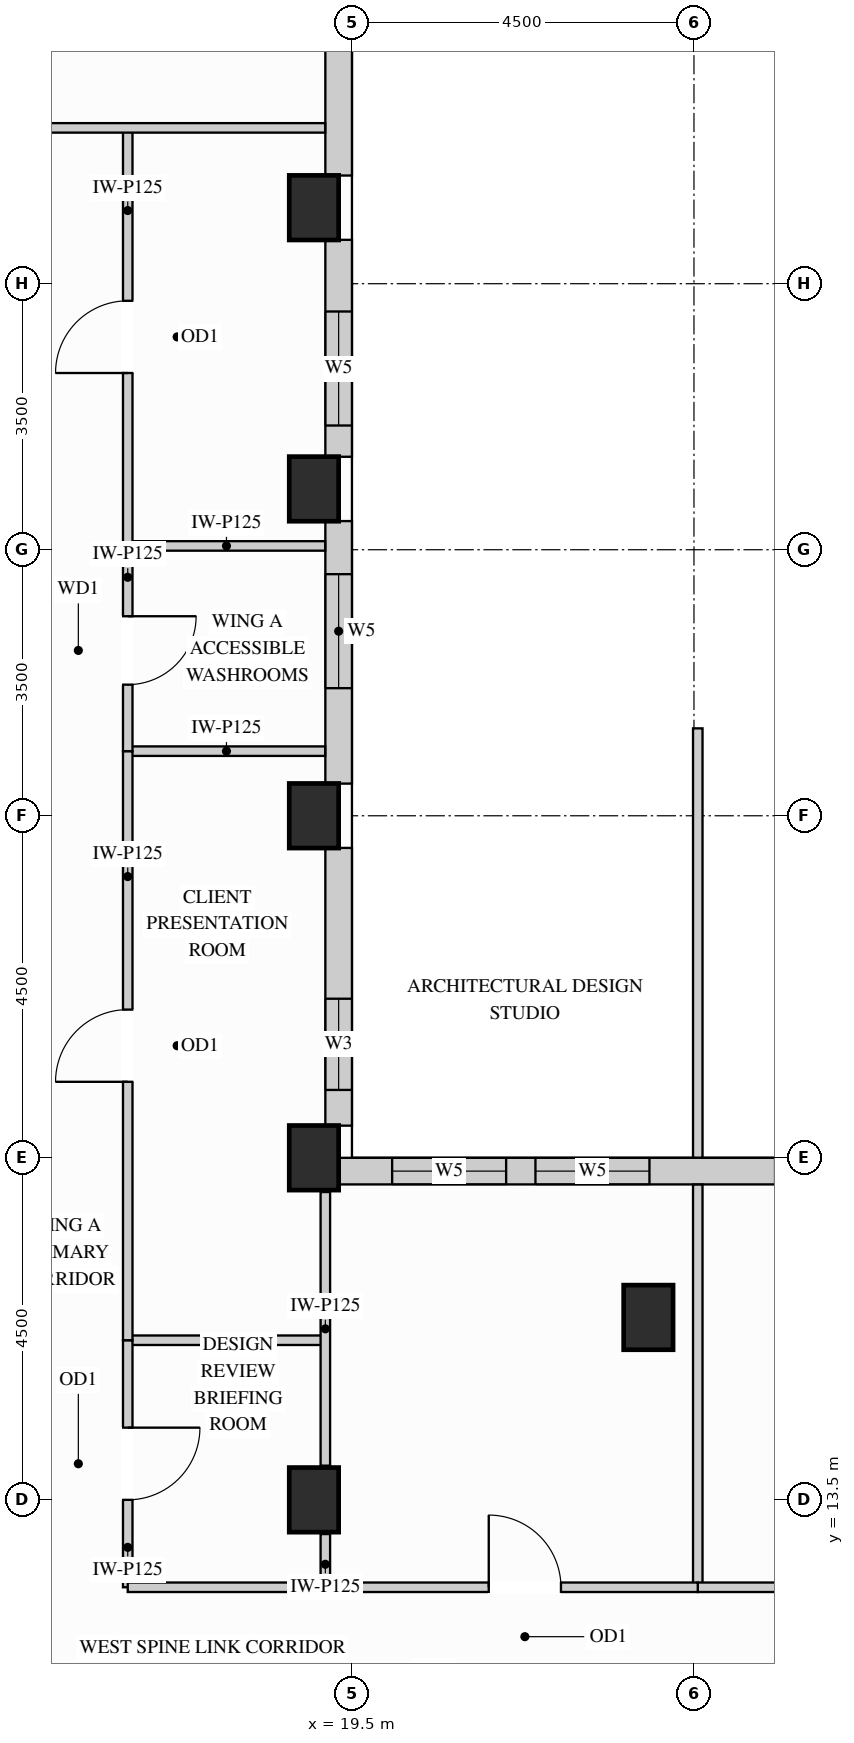
"""IFC4 building model, lengths in metres.
Left out: names, types, materials, properties, quantities, classifications, styles, units other than length and angle.
Written with IfcOpenShell. Run it as: python <this file> out.ifc"""

import sys

from ifc_helpers import new_model, si_unit, direction, frame, frame_2d, origin, origin_2d, place, context, subcontext, project, spatial, rectangle, extrude, source, transform, mapped, element, fill, save


model = new_model("IFC4")
c1 = context("Model", 3, precision=1e-05, world=origin(), true_north=direction((0.0, 1.0)))
c2 = subcontext(c1, "Body", "Model", "MODEL_VIEW")
j1 = project(units=[si_unit("LENGTHUNIT", "METRE"), si_unit("PLANEANGLEUNIT", "RADIAN")], contexts=[c1])
p1 = place(None, origin())
s1 = spatial("IfcSite", under=j1, at=p1, CompositionType="ELEMENT")
p2 = place(p1, origin())
s2 = spatial("IfcBuilding", under=s1, at=p2, CompositionType="ELEMENT")
p3 = place(p2, frame((0.0, 0.0, 219.6)))
s3 = spatial("IfcBuildingStorey", under=s2, at=p3, CompositionType="ELEMENT", Elevation=219.6)
m1 = source(origin(), c2, "Body", "SweptSolid", [
    extrude(rectangle(XDim=0.65, YDim=0.85, at=origin_2d()), origin(), (0.0, 0.0, 1.0), 3.4),
])
for number, where, z_axis, x_axis in (
    (1, (19.0, 13.5, 0.0), (0.0, 0.0, 1.0), (1.0, 0.0, 0.0)),
    (2, (19.0, 18.0, 0.0), (0.0, 0.0, 1.0), (1.0, 0.0, 0.0)),
    (3, (19.0, 22.5, 0.0), (0.0, 0.0, 1.0), (1.0, 0.0, 0.0)),
    (4, (19.0, 26.8, 0.0), (0.0, 0.0, 1.0), (1.0, 0.0, 0.0)),
    (5, (19.0, 30.5, 0.0), (0.0, 0.0, 1.0), (1.0, 0.0, 0.0)),
    (6, (23.4, 15.9, 0.0), (0.0, 0.0, 1.0), (1.0, 0.0, 0.0)),
):
    element("IfcColumn", number, at=place(p3, frame(where, z_axis=z_axis, x_axis=x_axis)), inside=s3, PredefinedType="COLUMN", context=c2, shape_type="MappedRepresentation", body=[
        mapped(m1, transform((0.0, 0.0, 0.0), x_axis=(1.0, 0.0, 0.0), y_axis=(0.0, 1.0, 0.0), z_axis=(0.0, 0.0, 1.0))),
    ])
p4 = place(p3, frame((34.577, 17.825, 0.0), z_axis=(0.0, 0.0, 1.0), x_axis=(-1.0, 0.0, 0.0)))
e7 = element("IfcWall", 7, at=p4, inside=s3, PredefinedType="SOLIDWALL", context=c2, shape_type="SweptSolid", body=[
    extrude(rectangle(XDim=15.254, YDim=0.35, at=frame_2d((7.627, 0.0))), origin(), (0.0, 0.0, 1.0), 3.385),
])
p5 = place(p4, frame((0.706, 0.0, 0.78)))
e8 = element("IfcOpeningElement", 8, at=p5, cuts=e7, PredefinedType="OPENING", context=c2, shape_type="SweptSolid", body=[
    extrude(rectangle(XDim=1.5, YDim=2.0, at=frame_2d((0.75, 1.0))), frame((0.0, 0.185, 0.0), z_axis=(0.0, -1.0, 0.0), x_axis=(1.0, 0.0, 0.0)), (0.0, 0.0, 1.0), 0.37),
])
p6 = place(p4, frame((2.591, 0.0, 0.78)))
e9 = element("IfcOpeningElement", 9, at=p6, cuts=e7, PredefinedType="OPENING", context=c2, shape_type="SweptSolid", body=[
    extrude(rectangle(XDim=1.5, YDim=2.0, at=frame_2d((0.75, 1.0))), frame((0.0, 0.185, 0.0), z_axis=(0.0, -1.0, 0.0), x_axis=(1.0, 0.0, 0.0)), (0.0, 0.0, 1.0), 0.37),
])
p7 = place(p4, frame((5.744, 0.0, 0.78)))
e10 = element("IfcOpeningElement", 10, at=p7, cuts=e7, PredefinedType="OPENING", context=c2, shape_type="SweptSolid", body=[
    extrude(rectangle(XDim=1.5, YDim=2.0, at=frame_2d((0.75, 1.0))), frame((0.0, 0.185, 0.0), z_axis=(0.0, -1.0, 0.0), x_axis=(1.0, 0.0, 0.0)), (0.0, 0.0, 1.0), 0.37),
])
p8 = place(p4, frame((8.01, 0.0, 0.78)))
e11 = element("IfcOpeningElement", 11, at=p8, cuts=e7, PredefinedType="OPENING", context=c2, shape_type="SweptSolid", body=[
    extrude(rectangle(XDim=1.5, YDim=2.0, at=frame_2d((0.75, 1.0))), frame((0.0, 0.185, 0.0), z_axis=(0.0, -1.0, 0.0), x_axis=(1.0, 0.0, 0.0)), (0.0, 0.0, 1.0), 0.37),
])
p9 = place(p4, frame((11.163, 0.0, 0.78)))
e12 = element("IfcOpeningElement", 12, at=p9, cuts=e7, PredefinedType="OPENING", context=c2, shape_type="SweptSolid", body=[
    extrude(rectangle(XDim=1.5, YDim=2.0, at=frame_2d((0.75, 1.0))), frame((0.0, 0.185, 0.0), z_axis=(0.0, -1.0, 0.0), x_axis=(1.0, 0.0, 0.0)), (0.0, 0.0, 1.0), 0.37),
])
p10 = place(p4, frame((13.048, 0.0, 0.78)))
e13 = element("IfcOpeningElement", 13, at=p10, cuts=e7, PredefinedType="OPENING", context=c2, shape_type="SweptSolid", body=[
    extrude(rectangle(XDim=1.5, YDim=2.0, at=frame_2d((0.75, 1.0))), frame((0.0, 0.185, 0.0), z_axis=(0.0, -1.0, 0.0), x_axis=(1.0, 0.0, 0.0)), (0.0, 0.0, 1.0), 0.37),
])
p11 = place(p3, frame((19.325, 18.423, 0.0), z_axis=(0.0, 0.0, 1.0), x_axis=(0.0, 1.0, 0.0)))
e14 = element("IfcWall", 14, at=p11, inside=s3, PredefinedType="SOLIDWALL", context=c2, shape_type="SweptSolid", body=[
    extrude(rectangle(XDim=3.654, YDim=0.35, at=frame_2d((1.827, 0.0))), origin(), (0.0, 0.0, 1.0), 2.619),
])
p12 = place(p11, frame((0.47, 0.0, 0.78)))
e15 = element("IfcOpeningElement", 15, at=p12, cuts=e14, PredefinedType="OPENING", context=c2, shape_type="SweptSolid", body=[
    extrude(rectangle(XDim=1.2, YDim=1.659, at=frame_2d((0.6, 0.83))), frame((0.0, 0.185, 0.0), z_axis=(0.0, -1.0, 0.0), x_axis=(1.0, 0.0, 0.0)), (0.0, 0.0, 1.0), 0.37),
])
p13 = place(p3, frame((19.325, 22.923, 0.0), z_axis=(0.0, 0.0, 1.0), x_axis=(0.0, 1.0, 0.0)))
e16 = element("IfcWall", 16, at=p13, inside=s3, PredefinedType="SOLIDWALL", context=c2, shape_type="SweptSolid", body=[
    extrude(rectangle(XDim=3.454, YDim=0.35, at=frame_2d((1.727, 0.0))), origin(), (0.0, 0.0, 1.0), 2.619),
])
p14 = place(p13, frame((1.256, 0.0, 0.78)))
e17 = element("IfcOpeningElement", 17, at=p14, cuts=e16, PredefinedType="OPENING", context=c2, shape_type="SweptSolid", body=[
    extrude(rectangle(XDim=1.5, YDim=1.659, at=frame_2d((0.75, 0.83))), frame((0.0, 0.185, 0.0), z_axis=(0.0, -1.0, 0.0), x_axis=(1.0, 0.0, 0.0)), (0.0, 0.0, 1.0), 0.37),
])
p15 = place(p3, frame((19.325, 27.223, 0.0), z_axis=(0.0, 0.0, 1.0), x_axis=(0.0, 1.0, 0.0)))
e18 = element("IfcWall", 18, at=p15, inside=s3, PredefinedType="SOLIDWALL", context=c2, shape_type="SweptSolid", body=[
    extrude(rectangle(XDim=2.854, YDim=0.35, at=frame_2d((1.427, 0.0))), origin(), (0.0, 0.0, 1.0), 2.619),
])
p16 = place(p15, frame((0.411, 0.0, 0.78)))
e19 = element("IfcOpeningElement", 19, at=p16, cuts=e18, PredefinedType="OPENING", context=c2, shape_type="SweptSolid", body=[
    extrude(rectangle(XDim=1.5, YDim=1.659, at=frame_2d((0.75, 0.83))), frame((0.0, 0.185, 0.0), z_axis=(0.0, -1.0, 0.0), x_axis=(1.0, 0.0, 0.0)), (0.0, 0.0, 1.0), 0.37),
])
m2 = source(origin(), c2, "Body", "SweptSolid", [
    extrude(rectangle(XDim=3.654, YDim=0.35, at=frame_2d((1.827, 0.0))), origin(), (0.0, 0.0, 1.0), 2.619),
])
p17 = place(p3, frame((19.325, 30.923, 0.0), z_axis=(0.0, 0.0, 1.0), x_axis=(0.0, 1.0, 0.0)))
e20 = element("IfcWall", 20, at=p17, inside=s3, PredefinedType="SOLIDWALL", context=c2, shape_type="MappedRepresentation", body=[
    mapped(m2, transform((0.0, 0.0, 0.0), x_axis=(1.0, 0.0, 0.0), y_axis=(0.0, 1.0, 0.0), z_axis=(0.0, 0.0, 1.0))),
])
m3 = source(origin(), c2, "Body", "SweptSolid", [
    extrude(rectangle(XDim=2.6, YDim=0.125, at=frame_2d((1.3, 0.0))), origin(), (0.0, 0.0, 1.0), 3.385),
])
p18 = place(p3, frame((16.55, 15.6, 0.0), z_axis=(0.0, 0.0, 1.0), x_axis=(1.0, 0.0, 0.0)))
e21 = element("IfcWall", 21, at=p18, inside=s3, PredefinedType="PARTITIONING", context=c2, shape_type="MappedRepresentation", body=[
    mapped(m3, transform((0.0, 0.0, 0.0), x_axis=(1.0, 0.0, 0.0), y_axis=(0.0, 1.0, 0.0), z_axis=(0.0, 0.0, 1.0))),
])
m4 = source(origin(), c2, "Body", "SweptSolid", [
    extrude(rectangle(XDim=2.598, YDim=0.125, at=frame_2d((1.299, 0.0))), origin(), (0.0, 0.0, 1.0), 3.385),
])
for number, where, z_axis, x_axis in (
    (22, (16.55, 23.35, 0.0), (0.0, 0.0, 1.0), (1.0, 0.0, 0.0)),
    (23, (16.55, 26.05, 0.0), (0.0, 0.0, 1.0), (1.0, 0.0, 0.0)),
):
    element("IfcWall", number, at=place(p3, frame(where, z_axis=z_axis, x_axis=x_axis)), inside=s3, PredefinedType="PARTITIONING", context=c2, shape_type="MappedRepresentation", body=[
        mapped(m4, transform((0.0, 0.0, 0.0), x_axis=(1.0, 0.0, 0.0), y_axis=(0.0, 1.0, 0.0), z_axis=(0.0, 0.0, 1.0))),
    ])
m5 = source(origin(), c2, "Body", "SweptSolid", [
    extrude(rectangle(XDim=0.7, YDim=0.125, at=frame_2d((0.35, 0.0))), origin(), (0.0, 0.0, 1.0), 2.773),
])
p19 = place(p3, frame((19.15, 12.35, 0.0), z_axis=(0.0, 0.0, 1.0), x_axis=(0.0, 1.0, 0.0)))
e24 = element("IfcWall", 24, at=p19, inside=s3, PredefinedType="PARTITIONING", context=c2, shape_type="MappedRepresentation", body=[
    mapped(m5, transform((0.0, 0.0, 0.0), x_axis=(1.0, 0.0, 0.0), y_axis=(0.0, 1.0, 0.0), z_axis=(0.0, 0.0, 1.0))),
])
m6 = source(origin(), c2, "Body", "SweptSolid", [
    extrude(rectangle(XDim=3.6, YDim=0.125, at=frame_2d((1.8, 0.0))), origin(), (0.0, 0.0, 1.0), 2.773),
])
p20 = place(p3, frame((19.15, 13.95, 0.0), z_axis=(0.0, 0.0, 1.0), x_axis=(0.0, 1.0, 0.0)))
e25 = element("IfcWall", 25, at=p20, inside=s3, PredefinedType="PARTITIONING", context=c2, shape_type="MappedRepresentation", body=[
    mapped(m6, transform((0.0, 0.0, 0.0), x_axis=(1.0, 0.0, 0.0), y_axis=(0.0, 1.0, 0.0), z_axis=(0.0, 0.0, 1.0))),
])
p21 = place(p3, frame((16.55, 12.35, 0.0), z_axis=(0.0, 0.0, 1.0), x_axis=(0.0, 1.0, 0.0)))
e26 = element("IfcWall", 26, at=p21, inside=s3, PredefinedType="PARTITIONING", context=c2, shape_type="SweptSolid", body=[
    extrude(rectangle(XDim=3.25, YDim=0.125, at=frame_2d((1.625, 0.0))), origin(), (0.0, 0.0, 1.0), 3.385),
])
p22 = place(p21, frame((1.15, 0.0, 0.0)))
e27 = element("IfcOpeningElement", 27, at=p22, cuts=e26, PredefinedType="OPENING", context=c2, shape_type="SweptSolid", body=[
    extrude(rectangle(XDim=0.95, YDim=2.15, at=frame_2d((0.475, 1.075))), frame((0.0, 0.073, 0.0), z_axis=(0.0, -1.0, 0.0), x_axis=(1.0, 0.0, 0.0)), (0.0, 0.0, 1.0), 0.145),
])
p23 = place(p3, frame((16.55, 15.6, 0.0), z_axis=(0.0, 0.0, 1.0), x_axis=(0.0, 1.0, 0.0)))
e28 = element("IfcWall", 28, at=p23, inside=s3, PredefinedType="PARTITIONING", context=c2, shape_type="SweptSolid", body=[
    extrude(rectangle(XDim=7.75, YDim=0.125, at=frame_2d((3.875, 0.0))), origin(), (0.0, 0.0, 1.0), 3.385),
])
p24 = place(p23, frame((3.4, 0.0, 0.0)))
e29 = element("IfcOpeningElement", 29, at=p24, cuts=e28, PredefinedType="OPENING", context=c2, shape_type="SweptSolid", body=[
    extrude(rectangle(XDim=0.95, YDim=2.15, at=frame_2d((0.475, 1.075))), frame((0.0, 0.073, 0.0), z_axis=(0.0, -1.0, 0.0), x_axis=(1.0, 0.0, 0.0)), (0.0, 0.0, 1.0), 0.145),
])
p25 = place(p3, frame((16.55, 26.05, 0.0), z_axis=(0.0, 0.0, 1.0), x_axis=(0.0, 1.0, 0.0)))
e30 = element("IfcWall", 30, at=p25, inside=s3, PredefinedType="PARTITIONING", context=c2, shape_type="SweptSolid", body=[
    extrude(rectangle(XDim=5.5, YDim=0.125, at=frame_2d((2.75, 0.0))), origin(), (0.0, 0.0, 1.0), 3.385),
])
p26 = place(p25, frame((2.275, 0.0, 0.0)))
e31 = element("IfcOpeningElement", 31, at=p26, cuts=e30, PredefinedType="OPENING", context=c2, shape_type="SweptSolid", body=[
    extrude(rectangle(XDim=0.95, YDim=2.15, at=frame_2d((0.475, 1.075))), frame((0.0, 0.073, 0.0), z_axis=(0.0, -1.0, 0.0), x_axis=(1.0, 0.0, 0.0)), (0.0, 0.0, 1.0), 0.145),
])
p27 = place(p3, frame((16.55, 23.35, 0.0), z_axis=(0.0, 0.0, 1.0), x_axis=(0.0, 1.0, 0.0)))
e32 = element("IfcWall", 32, at=p27, inside=s3, PredefinedType="PARTITIONING", context=c2, shape_type="SweptSolid", body=[
    extrude(rectangle(XDim=2.7, YDim=0.125, at=frame_2d((1.35, 0.0))), origin(), (0.0, 0.0, 1.0), 3.385),
])
p28 = place(p27, frame((0.875, 0.0, 0.0)))
e33 = element("IfcOpeningElement", 33, at=p28, cuts=e32, PredefinedType="OPENING", context=c2, shape_type="SweptSolid", body=[
    extrude(rectangle(XDim=0.9, YDim=2.15, at=frame_2d((0.45, 1.075))), frame((0.0, 0.073, 0.0), z_axis=(0.0, -1.0, 0.0), x_axis=(1.0, 0.0, 0.0)), (0.0, 0.0, 1.0), 0.145),
])
m7 = source(origin(), c2, "Body", "SweptSolid", [
    extrude(rectangle(XDim=12.598, YDim=0.125, at=frame_2d((6.299, 0.0))), origin(), (0.0, 0.0, 1.0), 3.385),
])
p29 = place(p3, frame((6.55, 31.55, 0.0), z_axis=(0.0, 0.0, 1.0), x_axis=(1.0, 0.0, 0.0)))
e34 = element("IfcWall", 34, at=p29, inside=s3, PredefinedType="PARTITIONING", context=c2, shape_type="MappedRepresentation", body=[
    mapped(m7, transform((0.0, 0.0, 0.0), x_axis=(1.0, 0.0, 0.0), y_axis=(0.0, 1.0, 0.0), z_axis=(0.0, 0.0, 1.0))),
])
m8 = source(origin(), c2, "Body", "SweptSolid", [
    extrude(rectangle(XDim=5.298, YDim=0.125, at=frame_2d((2.649, 0.0))), origin(), (0.0, 0.0, 1.0), 3.385),
])
p30 = place(p3, frame((24.05, 12.35, 0.0), z_axis=(0.0, 0.0, 1.0), x_axis=(0.0, 1.0, 0.0)))
e35 = element("IfcWall", 35, at=p30, inside=s3, PredefinedType="PARTITIONING", context=c2, shape_type="MappedRepresentation", body=[
    mapped(m8, transform((0.0, 0.0, 0.0), x_axis=(1.0, 0.0, 0.0), y_axis=(0.0, 1.0, 0.0), z_axis=(0.0, 0.0, 1.0))),
])
m9 = source(origin(), c2, "Body", "SweptSolid", [
    extrude(rectangle(XDim=5.648, YDim=0.125, at=frame_2d((2.824, 0.0))), origin(), (0.0, 0.0, 1.0), 3.385),
])
p31 = place(p3, frame((24.05, 18.002, 0.0), z_axis=(0.0, 0.0, 1.0), x_axis=(0.0, 1.0, 0.0)))
e36 = element("IfcWall", 36, at=p31, inside=s3, PredefinedType="PARTITIONING", context=c2, shape_type="MappedRepresentation", body=[
    mapped(m9, transform((0.0, 0.0, 0.0), x_axis=(1.0, 0.0, 0.0), y_axis=(0.0, 1.0, 0.0), z_axis=(0.0, 0.0, 1.0))),
])
p32 = place(p3, frame((24.05, 12.35, 0.0), z_axis=(0.0, 0.0, 1.0), x_axis=(1.0, 0.0, 0.0)))
e37 = element("IfcWall", 37, at=p32, inside=s3, PredefinedType="PARTITIONING", context=c2, shape_type="SweptSolid", body=[
    extrude(rectangle(XDim=5.8, YDim=0.125, at=frame_2d((2.9, 0.0))), origin(), (0.0, 0.0, 1.0), 3.385),
])
p33 = place(p32, frame((2.425, 0.0, 0.0)))
e38 = element("IfcOpeningElement", 38, at=p33, cuts=e37, PredefinedType="OPENING", context=c2, shape_type="SweptSolid", body=[
    extrude(rectangle(XDim=0.95, YDim=2.15, at=frame_2d((0.475, 1.075))), frame((0.0, 0.073, 0.0), z_axis=(0.0, -1.0, 0.0), x_axis=(1.0, 0.0, 0.0)), (0.0, 0.0, 1.0), 0.145),
])
m10 = source(origin(), c2, "Body", "SweptSolid", [
    extrude(rectangle(XDim=2.95, YDim=0.125, at=frame_2d((1.475, 0.0))), origin(), (0.0, 0.0, 1.0), 3.385),
])
p34 = place(p3, frame((16.55, 12.35, 0.0), z_axis=(0.0, 0.0, 1.0), x_axis=(1.0, 0.0, 0.0)))
e39 = element("IfcWall", 39, at=p34, inside=s3, PredefinedType="PARTITIONING", context=c2, shape_type="MappedRepresentation", body=[
    mapped(m10, transform((0.0, 0.0, 0.0), x_axis=(1.0, 0.0, 0.0), y_axis=(0.0, 1.0, 0.0), z_axis=(0.0, 0.0, 1.0))),
])
p35 = place(p3, frame((19.5, 12.35, 0.0), z_axis=(0.0, 0.0, 1.0), x_axis=(1.0, 0.0, 0.0)))
e40 = element("IfcWall", 40, at=p35, inside=s3, PredefinedType="PARTITIONING", context=c2, shape_type="SweptSolid", body=[
    extrude(rectangle(XDim=4.55, YDim=0.125, at=frame_2d((2.275, 0.0))), origin(), (0.0, 0.0, 1.0), 3.385),
])
p36 = place(p35, frame((1.8, 0.0, 0.0)))
e41 = element("IfcOpeningElement", 41, at=p36, cuts=e40, PredefinedType="OPENING", context=c2, shape_type="SweptSolid", body=[
    extrude(rectangle(XDim=0.95, YDim=2.15, at=frame_2d((0.475, 1.075))), frame((0.0, 0.073, 0.0), z_axis=(0.0, -1.0, 0.0), x_axis=(1.0, 0.0, 0.0)), (0.0, 0.0, 1.0), 0.145),
])
m11 = source(origin(), c2, "Body", "SweptSolid", [
    extrude(rectangle(XDim=0.95, YDim=2.15, at=frame_2d((0.475, 1.075))), frame((0.0, 0.025, 0.0), z_axis=(0.0, -1.0, 0.0), x_axis=(1.0, 0.0, 0.0)), (0.0, 0.0, 1.0), 0.05),
])
p37 = place(p22, origin())
e42 = element("IfcDoor", 42, at=p37, inside=s3, OperationType="SINGLE_SWING_RIGHT", PredefinedType="DOOR", context=c2, shape_type="MappedRepresentation", body=[
    mapped(m11, transform((0.0, 0.0, 0.0), x_axis=(1.0, 0.0, 0.0), y_axis=(0.0, 1.0, 0.0), z_axis=(0.0, 0.0, 1.0))),
])
fill(e27, e42)
p38 = place(p24, origin())
e43 = element("IfcDoor", 43, at=p38, inside=s3, OperationType="SINGLE_SWING_LEFT", PredefinedType="DOOR", context=c2, shape_type="MappedRepresentation", body=[
    mapped(m11, transform((0.0, 0.0, 0.0), x_axis=(1.0, 0.0, 0.0), y_axis=(0.0, 1.0, 0.0), z_axis=(0.0, 0.0, 1.0))),
])
fill(e29, e43)
p39 = place(p26, origin())
e44 = element("IfcDoor", 44, at=p39, inside=s3, OperationType="SINGLE_SWING_LEFT", PredefinedType="DOOR", context=c2, shape_type="MappedRepresentation", body=[
    mapped(m11, transform((0.0, 0.0, 0.0), x_axis=(1.0, 0.0, 0.0), y_axis=(0.0, 1.0, 0.0), z_axis=(0.0, 0.0, 1.0))),
])
fill(e31, e44)
p40 = place(p36, origin())
e45 = element("IfcDoor", 45, at=p40, inside=s3, OperationType="SINGLE_SWING_LEFT", PredefinedType="DOOR", context=c2, shape_type="MappedRepresentation", body=[
    mapped(m11, transform((0.0, 0.0, 0.0), x_axis=(1.0, 0.0, 0.0), y_axis=(0.0, 1.0, 0.0), z_axis=(0.0, 0.0, 1.0))),
])
fill(e41, e45)
m12 = source(origin(), c2, "Body", "SweptSolid", [
    extrude(rectangle(XDim=0.9, YDim=2.15, at=frame_2d((0.45, 1.075))), frame((0.0, 0.025, 0.0), z_axis=(0.0, -1.0, 0.0), x_axis=(1.0, 0.0, 0.0)), (0.0, 0.0, 1.0), 0.05),
])
p41 = place(p28, origin())
e46 = element("IfcDoor", 46, at=p41, inside=s3, OperationType="SINGLE_SWING_RIGHT", PredefinedType="DOOR", context=c2, shape_type="MappedRepresentation", body=[
    mapped(m12, transform((0.0, 0.0, 0.0), x_axis=(1.0, 0.0, 0.0), y_axis=(0.0, 1.0, 0.0), z_axis=(0.0, 0.0, 1.0))),
])
fill(e33, e46)
m13 = source(origin(), c2, "Body", "SweptSolid", [
    extrude(rectangle(XDim=1.2, YDim=1.659, at=frame_2d((0.6, 0.83))), frame((0.0, 0.03, 0.0), z_axis=(0.0, -1.0, 0.0), x_axis=(1.0, 0.0, 0.0)), (0.0, 0.0, 1.0), 0.06),
])
p42 = place(p12, origin())
e47 = element("IfcWindow", 47, at=p42, inside=s3, PartitioningType="SINGLE_PANEL", PredefinedType="WINDOW", context=c2, shape_type="MappedRepresentation", body=[
    mapped(m13, transform((0.0, 0.0, 0.0), x_axis=(1.0, 0.0, 0.0), y_axis=(0.0, 1.0, 0.0), z_axis=(0.0, 0.0, 1.0))),
])
fill(e15, e47)
m14 = source(origin(), c2, "Body", "SweptSolid", [
    extrude(rectangle(XDim=1.5, YDim=2.0, at=frame_2d((0.75, 1.0))), frame((0.0, 0.03, 0.0), z_axis=(0.0, -1.0, 0.0), x_axis=(1.0, 0.0, 0.0)), (0.0, 0.0, 1.0), 0.06),
])
p43 = place(p9, origin())
e48 = element("IfcWindow", 48, at=p43, inside=s3, PartitioningType="SINGLE_PANEL", PredefinedType="WINDOW", context=c2, shape_type="MappedRepresentation", body=[
    mapped(m14, transform((0.0, 0.0, 0.0), x_axis=(1.0, 0.0, 0.0), y_axis=(0.0, 1.0, 0.0), z_axis=(0.0, 0.0, 1.0))),
])
fill(e12, e48)
p44 = place(p10, origin())
e49 = element("IfcWindow", 49, at=p44, inside=s3, PartitioningType="SINGLE_PANEL", PredefinedType="WINDOW", context=c2, shape_type="MappedRepresentation", body=[
    mapped(m14, transform((0.0, 0.0, 0.0), x_axis=(1.0, 0.0, 0.0), y_axis=(0.0, 1.0, 0.0), z_axis=(0.0, 0.0, 1.0))),
])
fill(e13, e49)
m15 = source(origin(), c2, "Body", "SweptSolid", [
    extrude(rectangle(XDim=1.5, YDim=1.659, at=frame_2d((0.75, 0.83))), frame((0.0, 0.03, 0.0), z_axis=(0.0, -1.0, 0.0), x_axis=(1.0, 0.0, 0.0)), (0.0, 0.0, 1.0), 0.06),
])
p45 = place(p14, origin())
e50 = element("IfcWindow", 50, at=p45, inside=s3, PartitioningType="SINGLE_PANEL", PredefinedType="WINDOW", context=c2, shape_type="MappedRepresentation", body=[
    mapped(m15, transform((0.0, 0.0, 0.0), x_axis=(1.0, 0.0, 0.0), y_axis=(0.0, 1.0, 0.0), z_axis=(0.0, 0.0, 1.0))),
])
fill(e17, e50)
p46 = place(p16, origin())
e51 = element("IfcWindow", 51, at=p46, inside=s3, PartitioningType="SINGLE_PANEL", PredefinedType="WINDOW", context=c2, shape_type="MappedRepresentation", body=[
    mapped(m15, transform((0.0, 0.0, 0.0), x_axis=(1.0, 0.0, 0.0), y_axis=(0.0, 1.0, 0.0), z_axis=(0.0, 0.0, 1.0))),
])
fill(e19, e51)
save(model, sys.argv[1])
